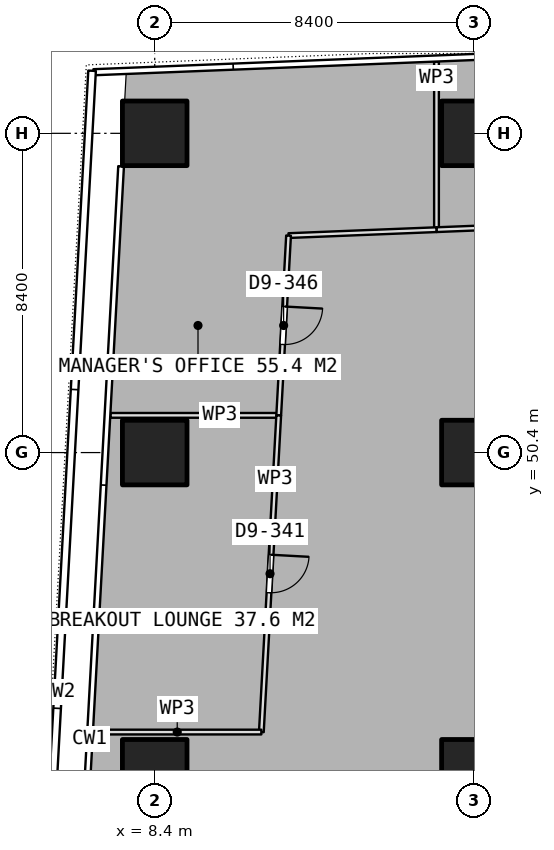
"""IFC4 building model, lengths in metres.
Left out: names, types, materials, properties, quantities, classifications, styles, units other than length and angle.
Written with IfcOpenShell. Run it as: python <this file> out.ifc"""

import sys

from ifc_helpers import new_model, si_unit, direction, frame, frame_2d, origin, origin_2d, place, context, subcontext, project, spatial, rectangle, extrude, element, fill, save


model = new_model("IFC4")
c1 = context("Model", 3, precision=1e-05, world=origin(), true_north=direction((0.0, 1.0)))
c2 = subcontext(c1, "Body", "Model", "MODEL_VIEW")
j1 = project(units=[si_unit("LENGTHUNIT", "METRE"), si_unit("PLANEANGLEUNIT", "RADIAN")], contexts=[c1])
p1 = place(None, origin())
s1 = spatial("IfcSite", under=j1, at=p1, CompositionType="ELEMENT")
p2 = place(p1, origin())
s2 = spatial("IfcBuilding", under=s1, at=p2, CompositionType="ELEMENT")
p3 = place(p2, frame((0.0, 0.0, 102.8)))
s3 = spatial("IfcBuildingStorey", under=s2, at=p3, CompositionType="ELEMENT", Elevation=102.8)
for number, where, z_axis, x_axis in (
    (1, (8.4, 42.0, 0.0), (0.0, 0.0, 1.0), (1.0, 0.0, 0.0)),
    (2, (8.4, 50.4, 0.0), (0.0, 0.0, 1.0), (1.0, 0.0, 0.0)),
    (3, (8.4, 58.8, 0.0), (0.0, 0.0, 1.0), (1.0, 0.0, 0.0)),
    (4, (16.8, 42.0, 0.0), (0.0, 0.0, 1.0), (1.0, 0.0, 0.0)),
    (5, (16.8, 50.4, 0.0), (0.0, 0.0, 1.0), (1.0, 0.0, 0.0)),
    (6, (16.8, 58.8, 0.0), (0.0, 0.0, 1.0), (1.0, 0.0, 0.0)),
):
    element("IfcColumn", number, at=place(p3, frame(where, z_axis=z_axis, x_axis=x_axis)), inside=s3, PredefinedType="COLUMN", context=c2, shape_type="SweptSolid", body=[
        extrude(rectangle(XDim=1.7, YDim=1.7, at=origin_2d()), origin(), (0.0, 0.0, 1.0), 3.75),
    ])
p4 = place(p3, frame((15.815, 56.265, 0.0), z_axis=(0.0, 0.0, 1.0), x_axis=(0.0, 1.0, 0.0)))
e7 = element("IfcWall", 7, at=p4, inside=s3, PredefinedType="PARTITIONING", context=c2, shape_type="SweptSolid", body=[
    extrude(rectangle(XDim=4.424, YDim=0.125, at=frame_2d((2.212, 0.0))), origin(), (0.0, 0.0, 1.0), 3.5),
])
p5 = place(p3, frame((25.413, 56.65, 0.0), z_axis=(0.0, 0.0, 1.0), x_axis=(-0.999196445736, -0.040080703946, 0.0)))
e8 = element("IfcWall", 8, at=p5, inside=s3, PredefinedType="PARTITIONING", context=c2, shape_type="SweptSolid", body=[
    extrude(rectangle(XDim=9.606, YDim=0.125, at=frame_2d((4.803, 0.0))), origin(), (0.0, 0.0, 1.0), 3.5),
])
p6 = place(p5, frame((4.303, 0.0, 0.0)))
e9 = element("IfcOpeningElement", 9, at=p6, cuts=e8, PredefinedType="OPENING", context=c2, shape_type="SweptSolid", body=[
    extrude(rectangle(XDim=1.0, YDim=2.1, at=frame_2d((0.5, 1.05))), frame((0.0, 0.073, 0.0), z_axis=(0.0, -1.0, 0.0), x_axis=(1.0, 0.0, 0.0)), (0.0, 0.0, 1.0), 0.145),
])
p7 = place(p3, frame((11.663, 51.379, 0.0), z_axis=(0.0, 0.0, 1.0), x_axis=(-1.0, 0.0, 0.0)))
e10 = element("IfcWall", 10, at=p7, inside=s3, PredefinedType="PARTITIONING", context=c2, shape_type="SweptSolid", body=[
    extrude(rectangle(XDim=4.427, YDim=0.125, at=frame_2d((2.213, 0.0))), origin(), (0.0, 0.0, 1.0), 3.5),
])
p8 = place(p3, frame((15.814, 56.265, 0.0), z_axis=(0.0, 0.0, 1.0), x_axis=(-0.999197550699, -0.040053148165, 0.0)))
e11 = element("IfcWall", 11, at=p8, inside=s3, PredefinedType="PARTITIONING", context=c2, shape_type="SweptSolid", body=[
    extrude(rectangle(XDim=3.895, YDim=0.125, at=frame_2d((1.948, 0.0))), origin(), (0.0, 0.0, 1.0), 3.5),
])
p9 = place(p3, frame((11.922, 56.109, 0.0), z_axis=(0.0, 0.0, 1.0), x_axis=(-0.054682179352, -0.998503810339, 0.0)))
e12 = element("IfcWall", 12, at=p9, inside=s3, PredefinedType="PARTITIONING", context=c2, shape_type="SweptSolid", body=[
    extrude(rectangle(XDim=4.737, YDim=0.125, at=frame_2d((2.369, 0.0))), origin(), (0.0, 0.0, 1.0), 3.5),
])
p10 = place(p9, frame((1.869, 0.0, 0.0)))
e13 = element("IfcOpeningElement", 13, at=p10, cuts=e12, PredefinedType="OPENING", context=c2, shape_type="SweptSolid", body=[
    extrude(rectangle(XDim=1.0, YDim=2.1, at=frame_2d((0.5, 1.05))), frame((0.0, 0.073, 0.0), z_axis=(0.0, -1.0, 0.0), x_axis=(1.0, 0.0, 0.0)), (0.0, 0.0, 1.0), 0.145),
])
p11 = place(p3, frame((11.663, 51.378, 0.0), z_axis=(0.0, 0.0, 1.0), x_axis=(-0.054769987218, -0.998498997746, 0.0)))
e14 = element("IfcWall", 14, at=p11, inside=s3, PredefinedType="PARTITIONING", context=c2, shape_type="SweptSolid", body=[
    extrude(rectangle(XDim=8.344, YDim=0.125, at=frame_2d((4.172, 0.0))), origin(), (0.0, 0.0, 1.0), 3.5),
])
p12 = place(p11, frame((3.672, 0.0, 0.0)))
e15 = element("IfcOpeningElement", 15, at=p12, cuts=e14, PredefinedType="OPENING", context=c2, shape_type="SweptSolid", body=[
    extrude(rectangle(XDim=1.0, YDim=2.1, at=frame_2d((0.5, 1.05))), frame((0.0, 0.073, 0.0), z_axis=(0.0, -1.0, 0.0), x_axis=(1.0, 0.0, 0.0)), (0.0, 0.0, 1.0), 0.145),
])
p13 = place(p3, frame((11.206, 43.046, 0.0), z_axis=(0.0, 0.0, 1.0), x_axis=(-1.0, 0.0, 0.0)))
e16 = element("IfcWall", 16, at=p13, inside=s3, PredefinedType="PARTITIONING", context=c2, shape_type="SweptSolid", body=[
    extrude(rectangle(XDim=4.427, YDim=0.125, at=frame_2d((2.213, 0.0))), origin(), (0.0, 0.0, 1.0), 3.5),
])
p14 = place(p10, origin())
e17 = element("IfcDoor", 17, at=p14, inside=s3, OperationType="SINGLE_SWING_LEFT", PredefinedType="DOOR", context=c2, shape_type="SweptSolid", body=[
    extrude(rectangle(XDim=1.0, YDim=2.1, at=frame_2d((0.5, 1.05))), frame((0.0, 0.025, 0.0), z_axis=(0.0, -1.0, 0.0), x_axis=(1.0, 0.0, 0.0)), (0.0, 0.0, 1.0), 0.05),
])
fill(e13, e17)
p15 = place(p12, origin())
e18 = element("IfcDoor", 18, at=p15, inside=s3, OperationType="SINGLE_SWING_LEFT", PredefinedType="DOOR", context=c2, shape_type="SweptSolid", body=[
    extrude(rectangle(XDim=1.0, YDim=2.1, at=frame_2d((0.5, 1.05))), frame((0.0, 0.025, 0.0), z_axis=(0.0, -1.0, 0.0), x_axis=(1.0, 0.0, 0.0)), (0.0, 0.0, 1.0), 0.05),
])
fill(e15, e18)
save(model, sys.argv[1])
